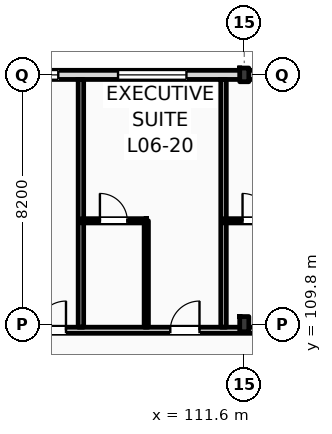
"""IFC4 building model, lengths in metres.
Left out: names, types, materials, properties, quantities, classifications, styles, units other than length and angle.
Written with IfcOpenShell. Run it as: python <this file> out.ifc"""

import sys

from ifc_helpers import new_model, si_unit, direction, frame, frame_2d, origin, origin_2d, place, context, subcontext, project, spatial, rectangle, i_section, extrude, element, fill, save


model = new_model("IFC4")
c1 = context("Model", 3, precision=1e-05, world=origin(), true_north=direction((0.0, 1.0)))
c2 = subcontext(c1, "Body", "Model", "MODEL_VIEW")
j1 = project(units=[si_unit("LENGTHUNIT", "METRE"), si_unit("PLANEANGLEUNIT", "RADIAN")], contexts=[c1])
p1 = place(None, origin())
s1 = spatial("IfcSite", under=j1, at=p1, CompositionType="ELEMENT")
p2 = place(p1, origin())
s2 = spatial("IfcBuilding", under=s1, at=p2, CompositionType="ELEMENT")
p3 = place(p2, frame((0.0, 0.0, 28.2)))
s3 = spatial("IfcBuildingStorey", under=s2, at=p3, CompositionType="ELEMENT", Elevation=28.2)
p4 = place(p3, frame((111.6, 109.8, 0.0), z_axis=(0.0, 0.0, 1.0), x_axis=(1.0, 0.0, 0.0)))
e1 = element("IfcColumn", 1, at=p4, inside=s3, PredefinedType="COLUMN", context=c2, shape_type="SweptSolid", body=[
    extrude(i_section(OverallWidth=0.3, OverallDepth=0.5, WebThickness=0.014, FlangeThickness=0.028, FilletRadius=0.027, at=origin_2d()), origin(), (0.0, 0.0, 1.0), 3.6),
])
p5 = place(p3, frame((111.6, 118.0, 0.0), z_axis=(0.0, 0.0, 1.0), x_axis=(1.0, 0.0, 0.0)))
e2 = element("IfcColumn", 2, at=p5, inside=s3, PredefinedType="COLUMN", context=c2, shape_type="SweptSolid", body=[
    extrude(i_section(OverallWidth=0.3, OverallDepth=0.45, WebThickness=0.014, FlangeThickness=0.026, FilletRadius=0.027, at=origin_2d()), origin(), (0.0, 0.0, 1.0), 3.6),
])
p6 = place(p3, frame((22.5, 118.0, 0.0), z_axis=(0.0, 0.0, 1.0), x_axis=(1.0, 0.0, 0.0)))
e3 = element("IfcWall", 3, at=p6, inside=s3, PredefinedType="STANDARD", context=c2, shape_type="SweptSolid", body=[
    extrude(rectangle(XDim=97.5, YDim=0.3, at=frame_2d((48.75, 0.0))), origin(), (0.0, 0.0, 1.0), 2.8),
])
p7 = place(p6, frame((0.91, 0.0, 0.9)))
e4 = element("IfcOpeningElement", 4, at=p7, cuts=e3, PredefinedType="OPENING", context=c2, shape_type="SweptSolid", body=[
    extrude(rectangle(XDim=0.9, YDim=1.72, at=frame_2d((0.45, 0.86))), frame((0.0, 0.16, 0.0), z_axis=(0.0, -1.0, 0.0), x_axis=(1.0, 0.0, 0.0)), (0.0, 0.0, 1.0), 0.32),
])
p8 = place(p6, frame((6.561, 0.0, 0.0)))
e5 = element("IfcOpeningElement", 5, at=p8, cuts=e3, PredefinedType="OPENING", context=c2, shape_type="SweptSolid", body=[
    extrude(rectangle(XDim=1.2, YDim=2.25, at=frame_2d((0.6, 1.125))), frame((0.0, 0.16, 0.0), z_axis=(0.0, -1.0, 0.0), x_axis=(1.0, 0.0, 0.0)), (0.0, 0.0, 1.0), 0.32),
])
p9 = place(p6, frame((11.477, 0.0, 0.9)))
e6 = element("IfcOpeningElement", 6, at=p9, cuts=e3, PredefinedType="OPENING", context=c2, shape_type="SweptSolid", body=[
    extrude(rectangle(XDim=1.1, YDim=1.5, at=frame_2d((0.55, 0.75))), frame((0.0, 0.16, 0.0), z_axis=(0.0, -1.0, 0.0), x_axis=(1.0, 0.0, 0.0)), (0.0, 0.0, 1.0), 0.32),
])
p10 = place(p6, frame((15.194, 0.0, 0.9)))
e7 = element("IfcOpeningElement", 7, at=p10, cuts=e3, PredefinedType="OPENING", context=c2, shape_type="SweptSolid", body=[
    extrude(rectangle(XDim=1.25, YDim=1.6, at=frame_2d((0.625, 0.8))), frame((0.0, 0.16, 0.0), z_axis=(0.0, -1.0, 0.0), x_axis=(1.0, 0.0, 0.0)), (0.0, 0.0, 1.0), 0.32),
])
p11 = place(p6, frame((19.509, 0.0, 0.9)))
e8 = element("IfcOpeningElement", 8, at=p11, cuts=e3, PredefinedType="OPENING", context=c2, shape_type="SweptSolid", body=[
    extrude(rectangle(XDim=1.4, YDim=1.7, at=frame_2d((0.7, 0.85))), frame((0.0, 0.16, 0.0), z_axis=(0.0, -1.0, 0.0), x_axis=(1.0, 0.0, 0.0)), (0.0, 0.0, 1.0), 0.32),
])
p12 = place(p6, frame((23.258, 0.0, 0.0)))
e9 = element("IfcOpeningElement", 9, at=p12, cuts=e3, PredefinedType="OPENING", context=c2, shape_type="SweptSolid", body=[
    extrude(rectangle(XDim=1.2, YDim=2.25, at=frame_2d((0.6, 1.125))), frame((0.0, 0.16, 0.0), z_axis=(0.0, -1.0, 0.0), x_axis=(1.0, 0.0, 0.0)), (0.0, 0.0, 1.0), 0.32),
])
p13 = place(p6, frame((28.115, 0.0, 0.9)))
e10 = element("IfcOpeningElement", 10, at=p13, cuts=e3, PredefinedType="OPENING", context=c2, shape_type="SweptSolid", body=[
    extrude(rectangle(XDim=1.75, YDim=1.72, at=frame_2d((0.875, 0.86))), frame((0.0, 0.16, 0.0), z_axis=(0.0, -1.0, 0.0), x_axis=(1.0, 0.0, 0.0)), (0.0, 0.0, 1.0), 0.32),
])
p14 = place(p6, frame((31.582, 0.0, 0.9)))
e11 = element("IfcOpeningElement", 11, at=p14, cuts=e3, PredefinedType="OPENING", context=c2, shape_type="SweptSolid", body=[
    extrude(rectangle(XDim=1.35, YDim=1.72, at=frame_2d((0.675, 0.86))), frame((0.0, 0.16, 0.0), z_axis=(0.0, -1.0, 0.0), x_axis=(1.0, 0.0, 0.0)), (0.0, 0.0, 1.0), 0.32),
])
p15 = place(p6, frame((37.379, 0.0, 0.0)))
e12 = element("IfcOpeningElement", 12, at=p15, cuts=e3, PredefinedType="OPENING", context=c2, shape_type="SweptSolid", body=[
    extrude(rectangle(XDim=1.2, YDim=2.25, at=frame_2d((0.6, 1.125))), frame((0.0, 0.16, 0.0), z_axis=(0.0, -1.0, 0.0), x_axis=(1.0, 0.0, 0.0)), (0.0, 0.0, 1.0), 0.32),
])
p16 = place(p6, frame((42.663, 0.0, 0.9)))
e13 = element("IfcOpeningElement", 13, at=p16, cuts=e3, PredefinedType="OPENING", context=c2, shape_type="SweptSolid", body=[
    extrude(rectangle(XDim=1.35, YDim=1.72, at=frame_2d((0.675, 0.86))), frame((0.0, 0.16, 0.0), z_axis=(0.0, -1.0, 0.0), x_axis=(1.0, 0.0, 0.0)), (0.0, 0.0, 1.0), 0.32),
])
p17 = place(p6, frame((45.119, 0.0, 0.9)))
e14 = element("IfcOpeningElement", 14, at=p17, cuts=e3, PredefinedType="OPENING", context=c2, shape_type="SweptSolid", body=[
    extrude(rectangle(XDim=2.871, YDim=1.72, at=frame_2d((1.436, 0.86))), frame((0.0, 0.16, 0.0), z_axis=(0.0, -1.0, 0.0), x_axis=(1.0, 0.0, 0.0)), (0.0, 0.0, 1.0), 0.32),
])
p18 = place(p6, frame((50.41, 0.0, 0.9)))
e15 = element("IfcOpeningElement", 15, at=p18, cuts=e3, PredefinedType="OPENING", context=c2, shape_type="SweptSolid", body=[
    extrude(rectangle(XDim=1.8, YDim=1.72, at=frame_2d((0.9, 0.86))), frame((0.0, 0.16, 0.0), z_axis=(0.0, -1.0, 0.0), x_axis=(1.0, 0.0, 0.0)), (0.0, 0.0, 1.0), 0.32),
])
p19 = place(p6, frame((54.375, 0.0, 0.0)))
e16 = element("IfcOpeningElement", 16, at=p19, cuts=e3, PredefinedType="OPENING", context=c2, shape_type="SweptSolid", body=[
    extrude(rectangle(XDim=1.2, YDim=2.25, at=frame_2d((0.6, 1.125))), frame((0.0, 0.16, 0.0), z_axis=(0.0, -1.0, 0.0), x_axis=(1.0, 0.0, 0.0)), (0.0, 0.0, 1.0), 0.32),
])
p20 = place(p6, frame((59.052, 0.0, 0.9)))
e17 = element("IfcOpeningElement", 17, at=p20, cuts=e3, PredefinedType="OPENING", context=c2, shape_type="SweptSolid", body=[
    extrude(rectangle(XDim=1.35, YDim=1.72, at=frame_2d((0.675, 0.86))), frame((0.0, 0.16, 0.0), z_axis=(0.0, -1.0, 0.0), x_axis=(1.0, 0.0, 0.0)), (0.0, 0.0, 1.0), 0.32),
])
p21 = place(p6, frame((62.768, 0.0, 0.9)))
e18 = element("IfcOpeningElement", 18, at=p21, cuts=e3, PredefinedType="OPENING", context=c2, shape_type="SweptSolid", body=[
    extrude(rectangle(XDim=1.5, YDim=1.72, at=frame_2d((0.75, 0.86))), frame((0.0, 0.16, 0.0), z_axis=(0.0, -1.0, 0.0), x_axis=(1.0, 0.0, 0.0)), (0.0, 0.0, 1.0), 0.32),
])
p22 = place(p6, frame((68.498, 0.0, 0.0)))
e19 = element("IfcOpeningElement", 19, at=p22, cuts=e3, PredefinedType="OPENING", context=c2, shape_type="SweptSolid", body=[
    extrude(rectangle(XDim=1.2, YDim=2.25, at=frame_2d((0.6, 1.125))), frame((0.0, 0.16, 0.0), z_axis=(0.0, -1.0, 0.0), x_axis=(1.0, 0.0, 0.0)), (0.0, 0.0, 1.0), 0.32),
])
p23 = place(p6, frame((71.265, 0.0, 0.9)))
e20 = element("IfcOpeningElement", 20, at=p23, cuts=e3, PredefinedType="OPENING", context=c2, shape_type="SweptSolid", body=[
    extrude(rectangle(XDim=0.9, YDim=1.72, at=frame_2d((0.45, 0.86))), frame((0.0, 0.16, 0.0), z_axis=(0.0, -1.0, 0.0), x_axis=(1.0, 0.0, 0.0)), (0.0, 0.0, 1.0), 0.32),
])
p24 = place(p6, frame((76.316, 0.0, 0.9)))
e21 = element("IfcOpeningElement", 21, at=p24, cuts=e3, PredefinedType="OPENING", context=c2, shape_type="SweptSolid", body=[
    extrude(rectangle(XDim=1.95, YDim=1.72, at=frame_2d((0.975, 0.86))), frame((0.0, 0.16, 0.0), z_axis=(0.0, -1.0, 0.0), x_axis=(1.0, 0.0, 0.0)), (0.0, 0.0, 1.0), 0.32),
])
p25 = place(p6, frame((81.632, 0.0, 0.9)))
e22 = element("IfcOpeningElement", 22, at=p25, cuts=e3, PredefinedType="OPENING", context=c2, shape_type="SweptSolid", body=[
    extrude(rectangle(XDim=1.35, YDim=1.72, at=frame_2d((0.675, 0.86))), frame((0.0, 0.16, 0.0), z_axis=(0.0, -1.0, 0.0), x_axis=(1.0, 0.0, 0.0)), (0.0, 0.0, 1.0), 0.32),
])
p26 = place(p6, frame((84.948, 0.0, 0.9)))
e23 = element("IfcOpeningElement", 23, at=p26, cuts=e3, PredefinedType="OPENING", context=c2, shape_type="SweptSolid", body=[
    extrude(rectangle(XDim=2.25, YDim=1.72, at=frame_2d((1.125, 0.86))), frame((0.0, 0.16, 0.0), z_axis=(0.0, -1.0, 0.0), x_axis=(1.0, 0.0, 0.0)), (0.0, 0.0, 1.0), 0.32),
])
p27 = place(p6, frame((90.063, 0.0, 0.9)))
e24 = element("IfcOpeningElement", 24, at=p27, cuts=e3, PredefinedType="OPENING", context=c2, shape_type="SweptSolid", body=[
    extrude(rectangle(XDim=1.8, YDim=1.72, at=frame_2d((0.9, 0.86))), frame((0.0, 0.16, 0.0), z_axis=(0.0, -1.0, 0.0), x_axis=(1.0, 0.0, 0.0)), (0.0, 0.0, 1.0), 0.32),
])
p28 = place(p6, frame((93.529, 0.0, 0.9)))
e25 = element("IfcOpeningElement", 25, at=p28, cuts=e3, PredefinedType="OPENING", context=c2, shape_type="SweptSolid", body=[
    extrude(rectangle(XDim=2.55, YDim=1.72, at=frame_2d((1.275, 0.86))), frame((0.0, 0.16, 0.0), z_axis=(0.0, -1.0, 0.0), x_axis=(1.0, 0.0, 0.0)), (0.0, 0.0, 1.0), 0.32),
])
p29 = place(p3, frame((10.65, 109.6, 0.0), z_axis=(0.0, 0.0, 1.0), x_axis=(1.0, 0.0, 0.0)))
e26 = element("IfcWall", 26, at=p29, inside=s3, PredefinedType="PARTITIONING", context=c2, shape_type="SweptSolid", body=[
    extrude(rectangle(XDim=109.21, YDim=0.2, at=frame_2d((54.605, 0.0))), origin(), (0.0, 0.0, 1.0), 2.8),
])
p30 = place(p29, frame((12.611, 0.0, 0.0)))
e27 = element("IfcOpeningElement", 27, at=p30, cuts=e26, PredefinedType="OPENING", context=c2, shape_type="SweptSolid", body=[
    extrude(rectangle(XDim=1.02, YDim=2.2, at=frame_2d((0.51, 1.1))), frame((0.0, 0.11, 0.0), z_axis=(0.0, -1.0, 0.0), x_axis=(1.0, 0.0, 0.0)), (0.0, 0.0, 1.0), 0.22),
])
p31 = place(p29, frame((19.451, 0.0, 0.0)))
e28 = element("IfcOpeningElement", 28, at=p31, cuts=e26, PredefinedType="OPENING", context=c2, shape_type="SweptSolid", body=[
    extrude(rectangle(XDim=1.02, YDim=2.2, at=frame_2d((0.51, 1.1))), frame((0.0, 0.11, 0.0), z_axis=(0.0, -1.0, 0.0), x_axis=(1.0, 0.0, 0.0)), (0.0, 0.0, 1.0), 0.22),
])
p32 = place(p29, frame((23.842, 0.0, 0.0)))
e29 = element("IfcOpeningElement", 29, at=p32, cuts=e26, PredefinedType="OPENING", context=c2, shape_type="SweptSolid", body=[
    extrude(rectangle(XDim=1.02, YDim=2.2, at=frame_2d((0.51, 1.1))), frame((0.0, 0.11, 0.0), z_axis=(0.0, -1.0, 0.0), x_axis=(1.0, 0.0, 0.0)), (0.0, 0.0, 1.0), 0.22),
])
p33 = place(p29, frame((26.084, 0.0, 0.0)))
e30 = element("IfcOpeningElement", 30, at=p33, cuts=e26, PredefinedType="OPENING", context=c2, shape_type="SweptSolid", body=[
    extrude(rectangle(XDim=1.02, YDim=2.2, at=frame_2d((0.51, 1.1))), frame((0.0, 0.11, 0.0), z_axis=(0.0, -1.0, 0.0), x_axis=(1.0, 0.0, 0.0)), (0.0, 0.0, 1.0), 0.22),
])
p34 = place(p29, frame((32.655, 0.0, 0.0)))
e31 = element("IfcOpeningElement", 31, at=p34, cuts=e26, PredefinedType="OPENING", context=c2, shape_type="SweptSolid", body=[
    extrude(rectangle(XDim=0.96, YDim=2.2, at=frame_2d((0.48, 1.1))), frame((0.0, 0.11, 0.0), z_axis=(0.0, -1.0, 0.0), x_axis=(1.0, 0.0, 0.0)), (0.0, 0.0, 1.0), 0.22),
])
p35 = place(p29, frame((34.895, 0.0, 0.0)))
e32 = element("IfcOpeningElement", 32, at=p35, cuts=e26, PredefinedType="OPENING", context=c2, shape_type="SweptSolid", body=[
    extrude(rectangle(XDim=0.96, YDim=2.2, at=frame_2d((0.48, 1.1))), frame((0.0, 0.11, 0.0), z_axis=(0.0, -1.0, 0.0), x_axis=(1.0, 0.0, 0.0)), (0.0, 0.0, 1.0), 0.22),
])
p36 = place(p29, frame((41.436, 0.0, 0.0)))
e33 = element("IfcOpeningElement", 33, at=p36, cuts=e26, PredefinedType="OPENING", context=c2, shape_type="SweptSolid", body=[
    extrude(rectangle(XDim=0.96, YDim=2.2, at=frame_2d((0.48, 1.1))), frame((0.0, 0.11, 0.0), z_axis=(0.0, -1.0, 0.0), x_axis=(1.0, 0.0, 0.0)), (0.0, 0.0, 1.0), 0.22),
])
p37 = place(p29, frame((43.427, 0.0, 0.0)))
e34 = element("IfcOpeningElement", 34, at=p37, cuts=e26, PredefinedType="OPENING", context=c2, shape_type="SweptSolid", body=[
    extrude(rectangle(XDim=0.96, YDim=2.2, at=frame_2d((0.48, 1.1))), frame((0.0, 0.11, 0.0), z_axis=(0.0, -1.0, 0.0), x_axis=(1.0, 0.0, 0.0)), (0.0, 0.0, 1.0), 0.22),
])
p38 = place(p29, frame((50.218, 0.0, 0.0)))
e35 = element("IfcOpeningElement", 35, at=p38, cuts=e26, PredefinedType="OPENING", context=c2, shape_type="SweptSolid", body=[
    extrude(rectangle(XDim=0.96, YDim=2.2, at=frame_2d((0.48, 1.1))), frame((0.0, 0.11, 0.0), z_axis=(0.0, -1.0, 0.0), x_axis=(1.0, 0.0, 0.0)), (0.0, 0.0, 1.0), 0.22),
])
p39 = place(p29, frame((54.859, 0.0, 0.0)))
e36 = element("IfcOpeningElement", 36, at=p39, cuts=e26, PredefinedType="OPENING", context=c2, shape_type="SweptSolid", body=[
    extrude(rectangle(XDim=0.96, YDim=2.2, at=frame_2d((0.48, 1.1))), frame((0.0, 0.11, 0.0), z_axis=(0.0, -1.0, 0.0), x_axis=(1.0, 0.0, 0.0)), (0.0, 0.0, 1.0), 0.22),
])
p40 = place(p29, frame((59.0, 0.0, 0.0)))
e37 = element("IfcOpeningElement", 37, at=p40, cuts=e26, PredefinedType="OPENING", context=c2, shape_type="SweptSolid", body=[
    extrude(rectangle(XDim=0.96, YDim=2.2, at=frame_2d((0.48, 1.1))), frame((0.0, 0.11, 0.0), z_axis=(0.0, -1.0, 0.0), x_axis=(1.0, 0.0, 0.0)), (0.0, 0.0, 1.0), 0.22),
])
p41 = place(p29, frame((63.39, 0.0, 0.0)))
e38 = element("IfcOpeningElement", 38, at=p41, cuts=e26, PredefinedType="OPENING", context=c2, shape_type="SweptSolid", body=[
    extrude(rectangle(XDim=0.96, YDim=2.2, at=frame_2d((0.48, 1.1))), frame((0.0, 0.11, 0.0), z_axis=(0.0, -1.0, 0.0), x_axis=(1.0, 0.0, 0.0)), (0.0, 0.0, 1.0), 0.22),
])
p42 = place(p29, frame((65.631, 0.0, 0.0)))
e39 = element("IfcOpeningElement", 39, at=p42, cuts=e26, PredefinedType="OPENING", context=c2, shape_type="SweptSolid", body=[
    extrude(rectangle(XDim=0.96, YDim=2.2, at=frame_2d((0.48, 1.1))), frame((0.0, 0.11, 0.0), z_axis=(0.0, -1.0, 0.0), x_axis=(1.0, 0.0, 0.0)), (0.0, 0.0, 1.0), 0.22),
])
p43 = place(p29, frame((72.172, 0.0, 0.0)))
e40 = element("IfcOpeningElement", 40, at=p43, cuts=e26, PredefinedType="OPENING", context=c2, shape_type="SweptSolid", body=[
    extrude(rectangle(XDim=0.96, YDim=2.2, at=frame_2d((0.48, 1.1))), frame((0.0, 0.11, 0.0), z_axis=(0.0, -1.0, 0.0), x_axis=(1.0, 0.0, 0.0)), (0.0, 0.0, 1.0), 0.22),
])
p44 = place(p29, frame((74.413, 0.0, 0.0)))
e41 = element("IfcOpeningElement", 41, at=p44, cuts=e26, PredefinedType="OPENING", context=c2, shape_type="SweptSolid", body=[
    extrude(rectangle(XDim=0.96, YDim=2.2, at=frame_2d((0.48, 1.1))), frame((0.0, 0.11, 0.0), z_axis=(0.0, -1.0, 0.0), x_axis=(1.0, 0.0, 0.0)), (0.0, 0.0, 1.0), 0.22),
])
p45 = place(p29, frame((80.954, 0.0, 0.0)))
e42 = element("IfcOpeningElement", 42, at=p45, cuts=e26, PredefinedType="OPENING", context=c2, shape_type="SweptSolid", body=[
    extrude(rectangle(XDim=0.96, YDim=2.2, at=frame_2d((0.48, 1.1))), frame((0.0, 0.11, 0.0), z_axis=(0.0, -1.0, 0.0), x_axis=(1.0, 0.0, 0.0)), (0.0, 0.0, 1.0), 0.22),
])
p46 = place(p29, frame((83.195, 0.0, 0.0)))
e43 = element("IfcOpeningElement", 43, at=p46, cuts=e26, PredefinedType="OPENING", context=c2, shape_type="SweptSolid", body=[
    extrude(rectangle(XDim=0.96, YDim=2.2, at=frame_2d((0.48, 1.1))), frame((0.0, 0.11, 0.0), z_axis=(0.0, -1.0, 0.0), x_axis=(1.0, 0.0, 0.0)), (0.0, 0.0, 1.0), 0.22),
])
p47 = place(p29, frame((89.735, 0.0, 0.0)))
e44 = element("IfcOpeningElement", 44, at=p47, cuts=e26, PredefinedType="OPENING", context=c2, shape_type="SweptSolid", body=[
    extrude(rectangle(XDim=0.96, YDim=2.2, at=frame_2d((0.48, 1.1))), frame((0.0, 0.11, 0.0), z_axis=(0.0, -1.0, 0.0), x_axis=(1.0, 0.0, 0.0)), (0.0, 0.0, 1.0), 0.22),
])
p48 = place(p29, frame((94.126, 0.0, 0.0)))
e45 = element("IfcOpeningElement", 45, at=p48, cuts=e26, PredefinedType="OPENING", context=c2, shape_type="SweptSolid", body=[
    extrude(rectangle(XDim=0.96, YDim=2.2, at=frame_2d((0.48, 1.1))), frame((0.0, 0.11, 0.0), z_axis=(0.0, -1.0, 0.0), x_axis=(1.0, 0.0, 0.0)), (0.0, 0.0, 1.0), 0.22),
])
p49 = place(p29, frame((98.517, 0.0, 0.0)))
e46 = element("IfcOpeningElement", 46, at=p49, cuts=e26, PredefinedType="OPENING", context=c2, shape_type="SweptSolid", body=[
    extrude(rectangle(XDim=0.96, YDim=2.2, at=frame_2d((0.48, 1.1))), frame((0.0, 0.11, 0.0), z_axis=(0.0, -1.0, 0.0), x_axis=(1.0, 0.0, 0.0)), (0.0, 0.0, 1.0), 0.22),
])
p50 = place(p29, frame((102.908, 0.0, 0.0)))
e47 = element("IfcOpeningElement", 47, at=p50, cuts=e26, PredefinedType="OPENING", context=c2, shape_type="SweptSolid", body=[
    extrude(rectangle(XDim=0.96, YDim=2.2, at=frame_2d((0.48, 1.1))), frame((0.0, 0.11, 0.0), z_axis=(0.0, -1.0, 0.0), x_axis=(1.0, 0.0, 0.0)), (0.0, 0.0, 1.0), 0.22),
])
p51 = place(p29, frame((105.099, 0.0, 0.0)))
e48 = element("IfcOpeningElement", 48, at=p51, cuts=e26, PredefinedType="OPENING", context=c2, shape_type="SweptSolid", body=[
    extrude(rectangle(XDim=0.96, YDim=2.2, at=frame_2d((0.48, 1.1))), frame((0.0, 0.11, 0.0), z_axis=(0.0, -1.0, 0.0), x_axis=(1.0, 0.0, 0.0)), (0.0, 0.0, 1.0), 0.22),
])
p52 = place(p29, frame((2.716, 0.0, 0.0)))
e49 = element("IfcOpeningElement", 49, at=p52, cuts=e26, PredefinedType="OPENING", context=c2, shape_type="SweptSolid", body=[
    extrude(rectangle(XDim=1.35, YDim=2.25, at=frame_2d((0.675, 1.125))), frame((0.0, 0.11, 0.0), z_axis=(0.0, -1.0, 0.0), x_axis=(1.0, 0.0, 0.0)), (0.0, 0.0, 1.0), 0.22),
])
p53 = place(p29, frame((6.65, 0.0, 0.0)))
e50 = element("IfcOpeningElement", 50, at=p53, cuts=e26, PredefinedType="OPENING", context=c2, shape_type="SweptSolid", body=[
    extrude(rectangle(XDim=1.35, YDim=2.25, at=frame_2d((0.675, 1.125))), frame((0.0, 0.11, 0.0), z_axis=(0.0, -1.0, 0.0), x_axis=(1.0, 0.0, 0.0)), (0.0, 0.0, 1.0), 0.22),
])
p54 = place(p29, frame((10.583, 0.0, 0.0)))
e51 = element("IfcOpeningElement", 51, at=p54, cuts=e26, PredefinedType="OPENING", context=c2, shape_type="SweptSolid", body=[
    extrude(rectangle(XDim=1.35, YDim=2.25, at=frame_2d((0.675, 1.125))), frame((0.0, 0.11, 0.0), z_axis=(0.0, -1.0, 0.0), x_axis=(1.0, 0.0, 0.0)), (0.0, 0.0, 1.0), 0.22),
])
p55 = place(p3, frame((106.227, 109.7, 0.0), z_axis=(0.0, 0.0, 1.0), x_axis=(0.0, 1.0, 0.0)))
e52 = element("IfcWall", 52, at=p55, inside=s3, PredefinedType="PARTITIONING", context=c2, shape_type="SweptSolid", body=[
    extrude(rectangle(XDim=8.15, YDim=0.18, at=frame_2d((4.075, 0.0))), origin(), (0.0, 0.0, 1.0), 3.05),
])
p56 = place(p3, frame((110.918, 109.7, 0.0), z_axis=(0.0, 0.0, 1.0), x_axis=(0.0, 1.0, 0.0)))
e53 = element("IfcWall", 53, at=p56, inside=s3, PredefinedType="PARTITIONING", context=c2, shape_type="SweptSolid", body=[
    extrude(rectangle(XDim=8.15, YDim=0.18, at=frame_2d((4.075, 0.0))), origin(), (0.0, 0.0, 1.0), 3.36),
])
p57 = place(p3, frame((108.377, 109.7, 0.0), z_axis=(0.0, 0.0, 1.0), x_axis=(0.0, 1.0, 0.0)))
e54 = element("IfcWall", 54, at=p57, inside=s3, PredefinedType="PARTITIONING", context=c2, shape_type="SweptSolid", body=[
    extrude(rectangle(XDim=3.5, YDim=0.14, at=frame_2d((1.75, 0.0))), origin(), (0.0, 0.0, 1.0), 3.36),
])
p58 = place(p3, frame((106.227, 113.2, 0.0), z_axis=(0.0, 0.0, 1.0), x_axis=(1.0, 0.0, 0.0)))
e55 = element("IfcWall", 55, at=p58, inside=s3, PredefinedType="PARTITIONING", context=c2, shape_type="SweptSolid", body=[
    extrude(rectangle(XDim=2.15, YDim=0.14, at=frame_2d((1.075, 0.0))), origin(), (0.0, 0.0, 1.0), 3.36),
])
p59 = place(p58, frame((0.625, 0.0, 0.0)))
e56 = element("IfcOpeningElement", 56, at=p59, cuts=e55, PredefinedType="OPENING", context=c2, shape_type="SweptSolid", body=[
    extrude(rectangle(XDim=0.9, YDim=2.1, at=frame_2d((0.45, 1.05))), frame((0.0, 0.08, 0.0), z_axis=(0.0, -1.0, 0.0), x_axis=(1.0, 0.0, 0.0)), (0.0, 0.0, 1.0), 0.16),
])
p60 = place(p3, frame((110.918, 113.2, 0.0), z_axis=(0.0, 0.0, 1.0), x_axis=(1.0, 0.0, 0.0)))
e57 = element("IfcWall", 57, at=p60, inside=s3, PredefinedType="PARTITIONING", context=c2, shape_type="SweptSolid", body=[
    extrude(rectangle(XDim=2.15, YDim=0.14, at=frame_2d((1.075, 0.0))), origin(), (0.0, 0.0, 1.0), 3.36),
])
p61 = place(p60, frame((0.625, 0.0, 0.0)))
e58 = element("IfcOpeningElement", 58, at=p61, cuts=e57, PredefinedType="OPENING", context=c2, shape_type="SweptSolid", body=[
    extrude(rectangle(XDim=0.9, YDim=2.1, at=frame_2d((0.45, 1.05))), frame((0.0, 0.08, 0.0), z_axis=(0.0, -1.0, 0.0), x_axis=(1.0, 0.0, 0.0)), (0.0, 0.0, 1.0), 0.16),
])
p62 = place(p25, origin())
e59 = element("IfcWindow", 59, at=p62, inside=s3, PartitioningType="DOUBLE_PANEL_VERTICAL", PredefinedType="WINDOW", context=c2, shape_type="SweptSolid", body=[
    extrude(rectangle(XDim=1.35, YDim=1.72, at=frame_2d((0.675, 0.86))), frame((0.0, 0.03, 0.0), z_axis=(0.0, -1.0, 0.0), x_axis=(1.0, 0.0, 0.0)), (0.0, 0.0, 1.0), 0.06),
])
fill(e22, e59)
p63 = place(p26, origin())
e60 = element("IfcWindow", 60, at=p63, inside=s3, PartitioningType="DOUBLE_PANEL_VERTICAL", PredefinedType="WINDOW", context=c2, shape_type="SweptSolid", body=[
    extrude(rectangle(XDim=2.25, YDim=1.72, at=frame_2d((1.125, 0.86))), frame((0.0, 0.03, 0.0), z_axis=(0.0, -1.0, 0.0), x_axis=(1.0, 0.0, 0.0)), (0.0, 0.0, 1.0), 0.06),
])
fill(e23, e60)
p64 = place(p48, origin())
e61 = element("IfcDoor", 61, at=p64, inside=s3, OperationType="SINGLE_SWING_RIGHT", PredefinedType="DOOR", context=c2, shape_type="SweptSolid", body=[
    extrude(rectangle(XDim=0.96, YDim=2.2, at=frame_2d((0.48, 1.1))), frame((0.0, 0.025, 0.0), z_axis=(0.0, -1.0, 0.0), x_axis=(1.0, 0.0, 0.0)), (0.0, 0.0, 1.0), 0.05),
])
fill(e45, e61)
p65 = place(p49, origin())
e62 = element("IfcDoor", 62, at=p65, inside=s3, OperationType="SINGLE_SWING_RIGHT", PredefinedType="DOOR", context=c2, shape_type="SweptSolid", body=[
    extrude(rectangle(XDim=0.96, YDim=2.2, at=frame_2d((0.48, 1.1))), frame((0.0, 0.025, 0.0), z_axis=(0.0, -1.0, 0.0), x_axis=(1.0, 0.0, 0.0)), (0.0, 0.0, 1.0), 0.05),
])
fill(e46, e62)
p66 = place(p59, origin())
e63 = element("IfcDoor", 63, at=p66, inside=s3, OperationType="SINGLE_SWING_LEFT", PredefinedType="DOOR", context=c2, shape_type="SweptSolid", body=[
    extrude(rectangle(XDim=0.9, YDim=2.1, at=frame_2d((0.45, 1.05))), frame((0.0, 0.025, 0.0), z_axis=(0.0, -1.0, 0.0), x_axis=(1.0, 0.0, 0.0)), (0.0, 0.0, 1.0), 0.05),
])
fill(e56, e63)
p67 = place(p61, origin())
e64 = element("IfcDoor", 64, at=p67, inside=s3, OperationType="SINGLE_SWING_LEFT", PredefinedType="DOOR", context=c2, shape_type="SweptSolid", body=[
    extrude(rectangle(XDim=0.9, YDim=2.1, at=frame_2d((0.45, 1.05))), frame((0.0, 0.025, 0.0), z_axis=(0.0, -1.0, 0.0), x_axis=(1.0, 0.0, 0.0)), (0.0, 0.0, 1.0), 0.05),
])
fill(e58, e64)
save(model, sys.argv[1])
